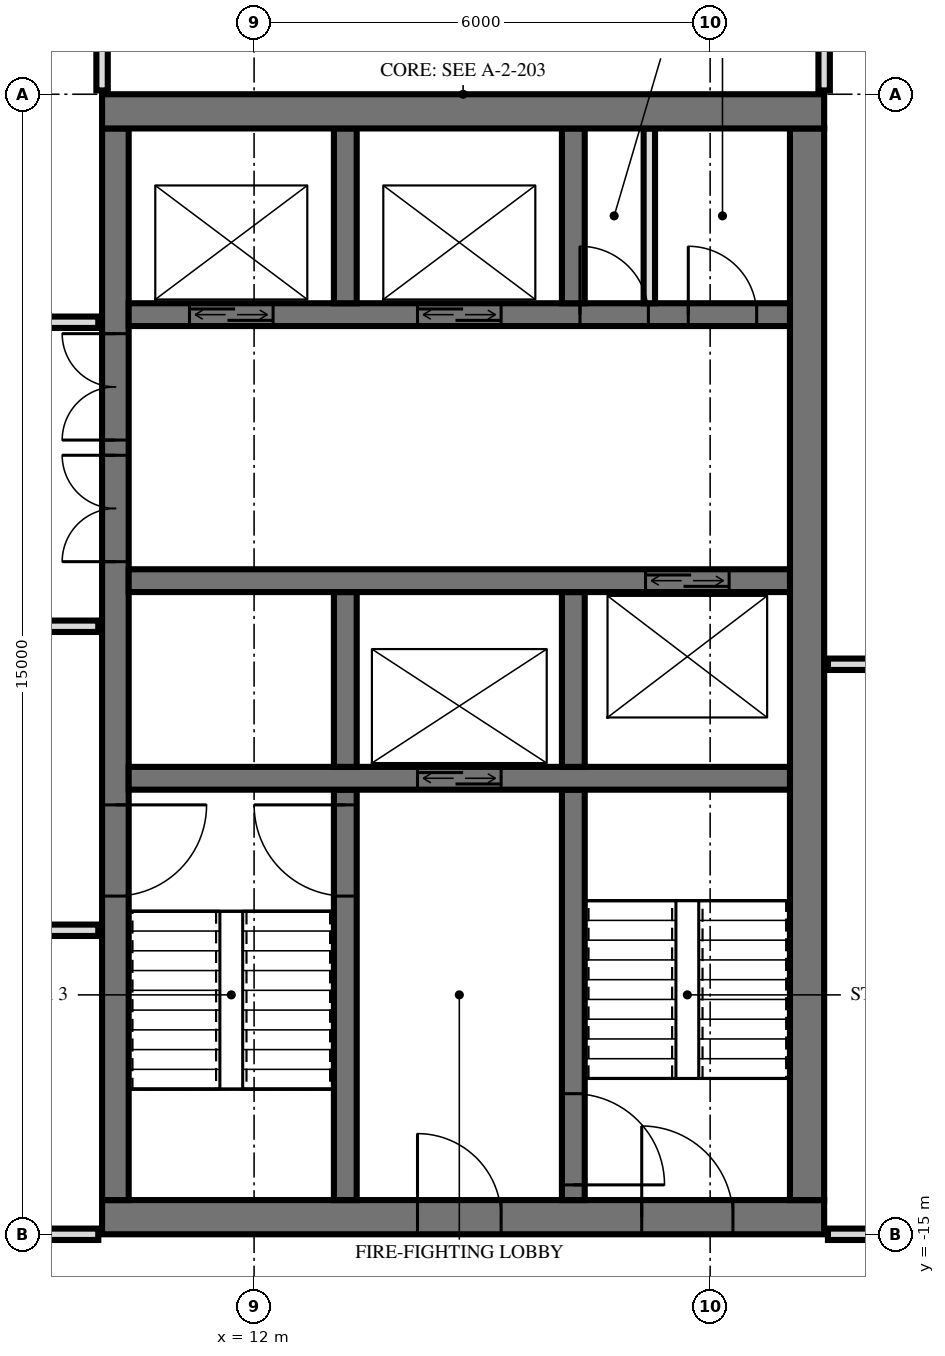
"""IFC4 building model, lengths in metres.
Left out: names, types, materials, properties, quantities, classifications, styles, units other than length and angle.
Written with IfcOpenShell. Run it as: python <this file> out.ifc"""

import sys

from ifc_helpers import new_model, si_unit, direction, frame, frame_2d, origin, place, context, subcontext, project, spatial, rectangle, extrude, element, fill, save


model = new_model("IFC4")
c1 = context("Model", 3, precision=1e-05, world=origin(), true_north=direction((0.0, 1.0)))
c2 = subcontext(c1, "Body", "Model", "MODEL_VIEW")
j1 = project(units=[si_unit("LENGTHUNIT", "METRE"), si_unit("PLANEANGLEUNIT", "RADIAN")], contexts=[c1])
p1 = place(None, origin())
s1 = spatial("IfcSite", under=j1, at=p1, CompositionType="ELEMENT")
p2 = place(p1, origin())
s2 = spatial("IfcBuilding", under=s1, at=p2, CompositionType="ELEMENT")
p3 = place(p2, frame((0.0, 0.0, 259.6)))
s3 = spatial("IfcBuildingStorey", under=s2, at=p3, CompositionType="ELEMENT", Elevation=259.6)
p4 = place(p3, frame((10.0, -0.225, 0.0), z_axis=(0.0, 0.0, 1.0), x_axis=(1.0, 0.0, 0.0)))
e1 = element("IfcWall", 1, at=p4, inside=s3, PredefinedType="SHEAR", context=c2, shape_type="SweptSolid", body=[
    extrude(rectangle(XDim=9.5, YDim=0.45, at=frame_2d((4.75, 0.0))), origin(), (0.0, 0.0, 1.0), 3.5),
])
p5 = place(p3, frame((10.0, -14.775, 0.0), z_axis=(0.0, 0.0, 1.0), x_axis=(1.0, 0.0, 0.0)))
e2 = element("IfcWall", 2, at=p5, inside=s3, PredefinedType="SHEAR", context=c2, shape_type="SweptSolid", body=[
    extrude(rectangle(XDim=9.5, YDim=0.45, at=frame_2d((4.75, 0.0))), origin(), (0.0, 0.0, 1.0), 3.5),
])
p6 = place(p5, frame((7.1, 0.0, 0.0)))
e3 = element("IfcOpeningElement", 3, at=p6, cuts=e2, PredefinedType="OPENING", context=c2, shape_type="SweptSolid", body=[
    extrude(rectangle(XDim=1.2, YDim=2.1, at=frame_2d((0.6, 1.05))), frame((0.0, 0.235, 0.0), z_axis=(0.0, -1.0, 0.0), x_axis=(1.0, 0.0, 0.0)), (0.0, 0.0, 1.0), 0.47),
])
p7 = place(p5, frame((4.15, 0.0, 0.0)))
e4 = element("IfcOpeningElement", 4, at=p7, cuts=e2, PredefinedType="OPENING", context=c2, shape_type="SweptSolid", body=[
    extrude(rectangle(XDim=1.1, YDim=2.1, at=frame_2d((0.55, 1.05))), frame((0.0, 0.235, 0.0), z_axis=(0.0, -1.0, 0.0), x_axis=(1.0, 0.0, 0.0)), (0.0, 0.0, 1.0), 0.47),
])
p8 = place(p3, frame((10.175, -14.55, 0.0), z_axis=(0.0, 0.0, 1.0), x_axis=(0.0, 1.0, 0.0)))
e5 = element("IfcWall", 5, at=p8, inside=s3, PredefinedType="SHEAR", context=c2, shape_type="SweptSolid", body=[
    extrude(rectangle(XDim=14.1, YDim=0.35, at=frame_2d((7.05, 0.0))), origin(), (0.0, 0.0, 1.0), 3.5),
])
p9 = place(p8, frame((8.4, 0.0, 0.0)))
e6 = element("IfcOpeningElement", 6, at=p9, cuts=e5, PredefinedType="OPENING", context=c2, shape_type="SweptSolid", body=[
    extrude(rectangle(XDim=1.4, YDim=2.4, at=frame_2d((0.7, 1.2))), frame((0.0, 0.185, 0.0), z_axis=(0.0, -1.0, 0.0), x_axis=(1.0, 0.0, 0.0)), (0.0, 0.0, 1.0), 0.37),
])
p10 = place(p8, frame((10.0, 0.0, 0.0)))
e7 = element("IfcOpeningElement", 7, at=p10, cuts=e5, PredefinedType="OPENING", context=c2, shape_type="SweptSolid", body=[
    extrude(rectangle(XDim=1.4, YDim=2.4, at=frame_2d((0.7, 1.2))), frame((0.0, 0.185, 0.0), z_axis=(0.0, -1.0, 0.0), x_axis=(1.0, 0.0, 0.0)), (0.0, 0.0, 1.0), 0.37),
])
p11 = place(p8, frame((4.0, 0.0, 0.0)))
e8 = element("IfcOpeningElement", 8, at=p11, cuts=e5, PredefinedType="OPENING", context=c2, shape_type="SweptSolid", body=[
    extrude(rectangle(XDim=1.2, YDim=2.1, at=frame_2d((0.6, 1.05))), frame((0.0, 0.185, 0.0), z_axis=(0.0, -1.0, 0.0), x_axis=(1.0, 0.0, 0.0)), (0.0, 0.0, 1.0), 0.37),
])
p12 = place(p3, frame((19.275, -14.55, 0.0), z_axis=(0.0, 0.0, 1.0), x_axis=(0.0, 1.0, 0.0)))
e9 = element("IfcWall", 9, at=p12, inside=s3, PredefinedType="SHEAR", context=c2, shape_type="SweptSolid", body=[
    extrude(rectangle(XDim=14.1, YDim=0.45, at=frame_2d((7.05, 0.0))), origin(), (0.0, 0.0, 1.0), 3.5),
])
p13 = place(p3, frame((10.35, -2.9, 0.0), z_axis=(0.0, 0.0, 1.0), x_axis=(1.0, 0.0, 0.0)))
e10 = element("IfcWall", 10, at=p13, inside=s3, PredefinedType="SHEAR", context=c2, shape_type="SweptSolid", body=[
    extrude(rectangle(XDim=8.7, YDim=0.3, at=frame_2d((4.35, 0.0))), origin(), (0.0, 0.0, 1.0), 3.5),
])
p14 = place(p13, frame((0.8, 0.0, 0.0)))
e11 = element("IfcOpeningElement", 11, at=p14, cuts=e10, PredefinedType="OPENING", context=c2, shape_type="SweptSolid", body=[
    extrude(rectangle(XDim=1.1, YDim=2.1, at=frame_2d((0.55, 1.05))), frame((0.0, 0.16, 0.0), z_axis=(0.0, -1.0, 0.0), x_axis=(1.0, 0.0, 0.0)), (0.0, 0.0, 1.0), 0.32),
])
p15 = place(p13, frame((3.8, 0.0, 0.0)))
e12 = element("IfcOpeningElement", 12, at=p15, cuts=e10, PredefinedType="OPENING", context=c2, shape_type="SweptSolid", body=[
    extrude(rectangle(XDim=1.1, YDim=2.1, at=frame_2d((0.55, 1.05))), frame((0.0, 0.16, 0.0), z_axis=(0.0, -1.0, 0.0), x_axis=(1.0, 0.0, 0.0)), (0.0, 0.0, 1.0), 0.32),
])
p16 = place(p13, frame((5.938, 0.0, 0.0)))
e13 = element("IfcOpeningElement", 13, at=p16, cuts=e10, PredefinedType="OPENING", context=c2, shape_type="SweptSolid", body=[
    extrude(rectangle(XDim=0.9, YDim=2.1, at=frame_2d((0.45, 1.05))), frame((0.0, 0.16, 0.0), z_axis=(0.0, -1.0, 0.0), x_axis=(1.0, 0.0, 0.0)), (0.0, 0.0, 1.0), 0.32),
])
p17 = place(p13, frame((7.363, 0.0, 0.0)))
e14 = element("IfcOpeningElement", 14, at=p17, cuts=e10, PredefinedType="OPENING", context=c2, shape_type="SweptSolid", body=[
    extrude(rectangle(XDim=0.9, YDim=2.1, at=frame_2d((0.45, 1.05))), frame((0.0, 0.16, 0.0), z_axis=(0.0, -1.0, 0.0), x_axis=(1.0, 0.0, 0.0)), (0.0, 0.0, 1.0), 0.32),
])
p18 = place(p3, frame((10.35, -6.4, 0.0), z_axis=(0.0, 0.0, 1.0), x_axis=(1.0, 0.0, 0.0)))
e15 = element("IfcWall", 15, at=p18, inside=s3, PredefinedType="SHEAR", context=c2, shape_type="SweptSolid", body=[
    extrude(rectangle(XDim=8.7, YDim=0.3, at=frame_2d((4.35, 0.0))), origin(), (0.0, 0.0, 1.0), 3.5),
])
p19 = place(p18, frame((6.8, 0.0, 0.0)))
e16 = element("IfcOpeningElement", 16, at=p19, cuts=e15, PredefinedType="OPENING", context=c2, shape_type="SweptSolid", body=[
    extrude(rectangle(XDim=1.1, YDim=2.1, at=frame_2d((0.55, 1.05))), frame((0.0, 0.16, 0.0), z_axis=(0.0, -1.0, 0.0), x_axis=(1.0, 0.0, 0.0)), (0.0, 0.0, 1.0), 0.32),
])
p20 = place(p3, frame((10.35, -9.0, 0.0), z_axis=(0.0, 0.0, 1.0), x_axis=(1.0, 0.0, 0.0)))
e17 = element("IfcWall", 17, at=p20, inside=s3, PredefinedType="SHEAR", context=c2, shape_type="SweptSolid", body=[
    extrude(rectangle(XDim=8.7, YDim=0.3, at=frame_2d((4.35, 0.0))), origin(), (0.0, 0.0, 1.0), 3.5),
])
p21 = place(p20, frame((3.8, 0.0, 0.0)))
e18 = element("IfcOpeningElement", 18, at=p21, cuts=e17, PredefinedType="OPENING", context=c2, shape_type="SweptSolid", body=[
    extrude(rectangle(XDim=1.1, YDim=2.1, at=frame_2d((0.55, 1.05))), frame((0.0, 0.16, 0.0), z_axis=(0.0, -1.0, 0.0), x_axis=(1.0, 0.0, 0.0)), (0.0, 0.0, 1.0), 0.32),
])
for number, where, z_axis, x_axis in (
    (19, (13.2, -2.75, 0.0), (0.0, 0.0, 1.0), (0.0, 1.0, 0.0)),
    (20, (13.2, -8.85, 0.0), (0.0, 0.0, 1.0), (0.0, 1.0, 0.0)),
):
    element("IfcWall", number, at=place(p3, frame(where, z_axis=z_axis, x_axis=x_axis)), inside=s3, PredefinedType="SHEAR", context=c2, shape_type="SweptSolid", body=[
        extrude(rectangle(XDim=2.3, YDim=0.3, at=frame_2d((1.15, 0.0))), origin(), (0.0, 0.0, 1.0), 3.5),
    ])
p22 = place(p3, frame((13.2, -14.55, 0.0), z_axis=(0.0, 0.0, 1.0), x_axis=(0.0, 1.0, 0.0)))
e21 = element("IfcWall", 21, at=p22, inside=s3, PredefinedType="SHEAR", context=c2, shape_type="SweptSolid", body=[
    extrude(rectangle(XDim=5.4, YDim=0.3, at=frame_2d((2.7, 0.0))), origin(), (0.0, 0.0, 1.0), 3.5),
])
p23 = place(p22, frame((4.0, 0.0, 0.0)))
e22 = element("IfcOpeningElement", 22, at=p23, cuts=e21, PredefinedType="OPENING", context=c2, shape_type="SweptSolid", body=[
    extrude(rectangle(XDim=1.2, YDim=2.1, at=frame_2d((0.6, 1.05))), frame((0.0, 0.16, 0.0), z_axis=(0.0, -1.0, 0.0), x_axis=(1.0, 0.0, 0.0)), (0.0, 0.0, 1.0), 0.32),
])
for number, where, z_axis, x_axis in (
    (23, (16.2, -2.75, 0.0), (0.0, 0.0, 1.0), (0.0, 1.0, 0.0)),
    (24, (16.2, -8.85, 0.0), (0.0, 0.0, 1.0), (0.0, 1.0, 0.0)),
):
    element("IfcWall", number, at=place(p3, frame(where, z_axis=z_axis, x_axis=x_axis)), inside=s3, PredefinedType="SHEAR", context=c2, shape_type="SweptSolid", body=[
        extrude(rectangle(XDim=2.3, YDim=0.3, at=frame_2d((1.15, 0.0))), origin(), (0.0, 0.0, 1.0), 3.5),
    ])
p24 = place(p3, frame((16.2, -14.55, 0.0), z_axis=(0.0, 0.0, 1.0), x_axis=(0.0, 1.0, 0.0)))
e25 = element("IfcWall", 25, at=p24, inside=s3, PredefinedType="SHEAR", context=c2, shape_type="SweptSolid", body=[
    extrude(rectangle(XDim=5.4, YDim=0.3, at=frame_2d((2.7, 0.0))), origin(), (0.0, 0.0, 1.0), 3.5),
])
p25 = place(p24, frame((0.2, 0.0, 0.0)))
e26 = element("IfcOpeningElement", 26, at=p25, cuts=e25, PredefinedType="OPENING", context=c2, shape_type="SweptSolid", body=[
    extrude(rectangle(XDim=1.2, YDim=2.1, at=frame_2d((0.6, 1.05))), frame((0.0, 0.16, 0.0), z_axis=(0.0, -1.0, 0.0), x_axis=(1.0, 0.0, 0.0)), (0.0, 0.0, 1.0), 0.32),
])
p26 = place(p3, frame((17.2, -2.75, 0.0), z_axis=(0.0, 0.0, 1.0), x_axis=(0.0, 1.0, 0.0)))
e27 = element("IfcWall", 27, at=p26, inside=s3, PredefinedType="PARTITIONING", context=c2, shape_type="SweptSolid", body=[
    extrude(rectangle(XDim=2.3, YDim=0.15, at=frame_2d((1.15, 0.0))), origin(), (0.0, 0.0, 1.0), 3.2),
])
p27 = place(p3, frame((19.5, 0.05, 0.0), z_axis=(0.0, 0.0, 1.0), x_axis=(0.0, 1.0, 0.0)))
e28 = element("IfcWall", 28, at=p27, inside=s3, PredefinedType="PARTITIONING", context=c2, shape_type="SweptSolid", body=[
    extrude(rectangle(XDim=0.787, YDim=0.15, at=frame_2d((0.394, 0.0))), origin(), (0.0, 0.0, 1.0), 3.22),
])
p28 = place(p3, frame((10.0, 0.05, 0.0), z_axis=(0.0, 0.0, 1.0), x_axis=(0.0, 1.0, 0.0)))
e29 = element("IfcWall", 29, at=p28, inside=s3, PredefinedType="PARTITIONING", context=c2, shape_type="SweptSolid", body=[
    extrude(rectangle(XDim=0.97, YDim=0.15, at=frame_2d((0.485, 0.0))), origin(), (0.0, 0.0, 1.0), 3.22),
])
p29 = place(p3, frame((-9.95, -15.0, 0.0), z_axis=(0.0, 0.0, 1.0), x_axis=(1.0, 0.0, 0.0)))
e30 = element("IfcWall", 30, at=p29, inside=s3, PredefinedType="PARTITIONING", context=c2, shape_type="SweptSolid", body=[
    extrude(rectangle(XDim=19.9, YDim=0.15, at=frame_2d((9.95, 0.0))), origin(), (0.0, 0.0, 1.0), 2.584),
])
p30 = place(p29, frame((9.45, 0.0, 0.0)))
e31 = element("IfcOpeningElement", 31, at=p30, cuts=e30, PredefinedType="OPENING", context=c2, shape_type="SweptSolid", body=[
    extrude(rectangle(XDim=1.0, YDim=2.1, at=frame_2d((0.5, 1.05))), frame((0.0, 0.085, 0.0), z_axis=(0.0, -1.0, 0.0), x_axis=(1.0, 0.0, 0.0)), (0.0, 0.0, 1.0), 0.17),
])
p31 = place(p3, frame((19.55, -15.0, 0.0), z_axis=(0.0, 0.0, 1.0), x_axis=(1.0, 0.0, 0.0)))
e32 = element("IfcWall", 32, at=p31, inside=s3, PredefinedType="PARTITIONING", context=c2, shape_type="SweptSolid", body=[
    extrude(rectangle(XDim=3.37, YDim=0.15, at=frame_2d((1.685, 0.0))), origin(), (0.0, 0.0, 1.0), 3.22),
])
p32 = place(p31, frame((0.9, 0.0, 0.0)))
e33 = element("IfcOpeningElement", 33, at=p32, cuts=e32, PredefinedType="OPENING", context=c2, shape_type="SweptSolid", body=[
    extrude(rectangle(XDim=1.0, YDim=2.1, at=frame_2d((0.5, 1.05))), frame((0.0, 0.085, 0.0), z_axis=(0.0, -1.0, 0.0), x_axis=(1.0, 0.0, 0.0)), (0.0, 0.0, 1.0), 0.17),
])
p33 = place(p3, frame((-9.95, -11.0, 0.0), z_axis=(0.0, 0.0, 1.0), x_axis=(1.0, 0.0, 0.0)))
e34 = element("IfcWall", 34, at=p33, inside=s3, PredefinedType="PARTITIONING", context=c2, shape_type="SweptSolid", body=[
    extrude(rectangle(XDim=19.9, YDim=0.15, at=frame_2d((9.95, 0.0))), origin(), (0.0, 0.0, 1.0), 3.22),
])
p34 = place(p33, frame((9.45, 0.0, 0.0)))
e35 = element("IfcOpeningElement", 35, at=p34, cuts=e34, PredefinedType="OPENING", context=c2, shape_type="SweptSolid", body=[
    extrude(rectangle(XDim=1.0, YDim=2.1, at=frame_2d((0.5, 1.05))), frame((0.0, 0.085, 0.0), z_axis=(0.0, -1.0, 0.0), x_axis=(1.0, 0.0, 0.0)), (0.0, 0.0, 1.0), 0.17),
])
p35 = place(p33, frame((15.45, 0.0, 0.0)))
e36 = element("IfcOpeningElement", 36, at=p35, cuts=e34, PredefinedType="OPENING", context=c2, shape_type="SweptSolid", body=[
    extrude(rectangle(XDim=1.0, YDim=2.1, at=frame_2d((0.5, 1.05))), frame((0.0, 0.085, 0.0), z_axis=(0.0, -1.0, 0.0), x_axis=(1.0, 0.0, 0.0)), (0.0, 0.0, 1.0), 0.17),
])
p36 = place(p3, frame((19.55, -7.5, 0.0), z_axis=(0.0, 0.0, 1.0), x_axis=(1.0, 0.0, 0.0)))
e37 = element("IfcWall", 37, at=p36, inside=s3, PredefinedType="PARTITIONING", context=c2, shape_type="SweptSolid", body=[
    extrude(rectangle(XDim=3.37, YDim=0.15, at=frame_2d((1.685, 0.0))), origin(), (0.0, 0.0, 1.0), 3.22),
])
p37 = place(p36, frame((1.3, 0.0, 0.0)))
e38 = element("IfcOpeningElement", 38, at=p37, cuts=e37, PredefinedType="OPENING", context=c2, shape_type="SweptSolid", body=[
    extrude(rectangle(XDim=0.9, YDim=2.1, at=frame_2d((0.45, 1.05))), frame((0.0, 0.085, 0.0), z_axis=(0.0, -1.0, 0.0), x_axis=(1.0, 0.0, 0.0)), (0.0, 0.0, 1.0), 0.17),
])
p38 = place(p3, frame((-9.95, -7.0, 0.0), z_axis=(0.0, 0.0, 1.0), x_axis=(1.0, 0.0, 0.0)))
e39 = element("IfcWall", 39, at=p38, inside=s3, PredefinedType="PARTITIONING", context=c2, shape_type="SweptSolid", body=[
    extrude(rectangle(XDim=19.9, YDim=0.15, at=frame_2d((9.95, 0.0))), origin(), (0.0, 0.0, 1.0), 3.22),
])
p39 = place(p38, frame((9.45, 0.0, 0.0)))
e40 = element("IfcOpeningElement", 40, at=p39, cuts=e39, PredefinedType="OPENING", context=c2, shape_type="SweptSolid", body=[
    extrude(rectangle(XDim=1.0, YDim=2.1, at=frame_2d((0.5, 1.05))), frame((0.0, 0.085, 0.0), z_axis=(0.0, -1.0, 0.0), x_axis=(1.0, 0.0, 0.0)), (0.0, 0.0, 1.0), 0.17),
])
p40 = place(p38, frame((3.45, 0.0, 0.0)))
e41 = element("IfcOpeningElement", 41, at=p40, cuts=e39, PredefinedType="OPENING", context=c2, shape_type="SweptSolid", body=[
    extrude(rectangle(XDim=1.0, YDim=2.1, at=frame_2d((0.5, 1.05))), frame((0.0, 0.085, 0.0), z_axis=(0.0, -1.0, 0.0), x_axis=(1.0, 0.0, 0.0)), (0.0, 0.0, 1.0), 0.17),
])
p41 = place(p3, frame((-9.95, -3.0, 0.0), z_axis=(0.0, 0.0, 1.0), x_axis=(1.0, 0.0, 0.0)))
e42 = element("IfcWall", 42, at=p41, inside=s3, PredefinedType="PARTITIONING", context=c2, shape_type="SweptSolid", body=[
    extrude(rectangle(XDim=19.9, YDim=0.15, at=frame_2d((9.95, 0.0))), origin(), (0.0, 0.0, 1.0), 3.22),
])
p42 = place(p41, frame((0.95, 0.0, 0.0)))
e43 = element("IfcOpeningElement", 43, at=p42, cuts=e42, PredefinedType="OPENING", context=c2, shape_type="SweptSolid", body=[
    extrude(rectangle(XDim=1.0, YDim=2.1, at=frame_2d((0.5, 1.05))), frame((0.0, 0.085, 0.0), z_axis=(0.0, -1.0, 0.0), x_axis=(1.0, 0.0, 0.0)), (0.0, 0.0, 1.0), 0.17),
])
p43 = place(p41, frame((3.7, 0.0, 0.0)))
e44 = element("IfcOpeningElement", 44, at=p43, cuts=e42, PredefinedType="OPENING", context=c2, shape_type="SweptSolid", body=[
    extrude(rectangle(XDim=1.0, YDim=2.1, at=frame_2d((0.5, 1.05))), frame((0.0, 0.085, 0.0), z_axis=(0.0, -1.0, 0.0), x_axis=(1.0, 0.0, 0.0)), (0.0, 0.0, 1.0), 0.17),
])
p44 = place(p41, frame((8.45, 0.0, 0.0)))
e45 = element("IfcOpeningElement", 45, at=p44, cuts=e42, PredefinedType="OPENING", context=c2, shape_type="SweptSolid", body=[
    extrude(rectangle(XDim=1.0, YDim=2.1, at=frame_2d((0.5, 1.05))), frame((0.0, 0.085, 0.0), z_axis=(0.0, -1.0, 0.0), x_axis=(1.0, 0.0, 0.0)), (0.0, 0.0, 1.0), 0.17),
])
p45 = place(p41, frame((15.7, 0.0, 0.0)))
e46 = element("IfcOpeningElement", 46, at=p45, cuts=e42, PredefinedType="OPENING", context=c2, shape_type="SweptSolid", body=[
    extrude(rectangle(XDim=1.0, YDim=2.1, at=frame_2d((0.5, 1.05))), frame((0.0, 0.085, 0.0), z_axis=(0.0, -1.0, 0.0), x_axis=(1.0, 0.0, 0.0)), (0.0, 0.0, 1.0), 0.17),
])
p46 = place(p14, origin())
e47 = element("IfcDoor", 47, at=p46, inside=s3, OperationType="DOUBLE_DOOR_SLIDING", PredefinedType="USERDEFINED", context=c2, shape_type="SweptSolid", body=[
    extrude(rectangle(XDim=1.1, YDim=2.1, at=frame_2d((0.55, 1.05))), frame((0.0, 0.025, 0.0), z_axis=(0.0, -1.0, 0.0), x_axis=(1.0, 0.0, 0.0)), (0.0, 0.0, 1.0), 0.05),
])
fill(e11, e47)
p47 = place(p15, origin())
e48 = element("IfcDoor", 48, at=p47, inside=s3, OperationType="DOUBLE_DOOR_SLIDING", PredefinedType="USERDEFINED", context=c2, shape_type="SweptSolid", body=[
    extrude(rectangle(XDim=1.1, YDim=2.1, at=frame_2d((0.55, 1.05))), frame((0.0, 0.025, 0.0), z_axis=(0.0, -1.0, 0.0), x_axis=(1.0, 0.0, 0.0)), (0.0, 0.0, 1.0), 0.05),
])
fill(e12, e48)
p48 = place(p21, origin())
e49 = element("IfcDoor", 49, at=p48, inside=s3, OperationType="DOUBLE_DOOR_SLIDING", PredefinedType="USERDEFINED", context=c2, shape_type="SweptSolid", body=[
    extrude(rectangle(XDim=1.1, YDim=2.1, at=frame_2d((0.55, 1.05))), frame((0.0, 0.025, 0.0), z_axis=(0.0, -1.0, 0.0), x_axis=(1.0, 0.0, 0.0)), (0.0, 0.0, 1.0), 0.05),
])
fill(e18, e49)
p49 = place(p19, origin())
e50 = element("IfcDoor", 50, at=p49, inside=s3, OperationType="DOUBLE_DOOR_SLIDING", PredefinedType="USERDEFINED", context=c2, shape_type="SweptSolid", body=[
    extrude(rectangle(XDim=1.1, YDim=2.1, at=frame_2d((0.55, 1.05))), frame((0.0, 0.025, 0.0), z_axis=(0.0, -1.0, 0.0), x_axis=(1.0, 0.0, 0.0)), (0.0, 0.0, 1.0), 0.05),
])
fill(e16, e50)
p50 = place(p9, origin())
e51 = element("IfcDoor", 51, at=p50, inside=s3, OperationType="DOUBLE_DOOR_SINGLE_SWING", PredefinedType="DOOR", context=c2, shape_type="SweptSolid", body=[
    extrude(rectangle(XDim=1.4, YDim=2.4, at=frame_2d((0.7, 1.2))), frame((0.0, 0.025, 0.0), z_axis=(0.0, -1.0, 0.0), x_axis=(1.0, 0.0, 0.0)), (0.0, 0.0, 1.0), 0.05),
])
fill(e6, e51)
p51 = place(p10, origin())
e52 = element("IfcDoor", 52, at=p51, inside=s3, OperationType="DOUBLE_DOOR_SINGLE_SWING", PredefinedType="DOOR", context=c2, shape_type="SweptSolid", body=[
    extrude(rectangle(XDim=1.4, YDim=2.4, at=frame_2d((0.7, 1.2))), frame((0.0, 0.025, 0.0), z_axis=(0.0, -1.0, 0.0), x_axis=(1.0, 0.0, 0.0)), (0.0, 0.0, 1.0), 0.05),
])
fill(e7, e52)
p52 = place(p11, frame((0.6, 0.0, 0.0), z_axis=(0.0, 0.0, 1.0), x_axis=(-1.0, 0.0, 0.0)))
e53 = element("IfcDoor", 53, at=p52, inside=s3, OperationType="SINGLE_SWING_RIGHT", PredefinedType="DOOR", context=c2, shape_type="SweptSolid", body=[
    extrude(rectangle(XDim=1.2, YDim=2.1, at=frame_2d((0.0, 1.05))), frame((0.0, -0.025, 0.0), z_axis=(0.0, 1.0, 0.0), x_axis=(-1.0, 0.0, 0.0)), (0.0, 0.0, 1.0), 0.05),
])
fill(e8, e53)
p53 = place(p6, origin())
e54 = element("IfcDoor", 54, at=p53, inside=s3, OperationType="SINGLE_SWING_RIGHT", PredefinedType="DOOR", context=c2, shape_type="SweptSolid", body=[
    extrude(rectangle(XDim=1.2, YDim=2.1, at=frame_2d((0.6, 1.05))), frame((0.0, 0.025, 0.0), z_axis=(0.0, -1.0, 0.0), x_axis=(1.0, 0.0, 0.0)), (0.0, 0.0, 1.0), 0.05),
])
fill(e3, e54)
p54 = place(p7, origin())
e55 = element("IfcDoor", 55, at=p54, inside=s3, OperationType="SINGLE_SWING_RIGHT", PredefinedType="DOOR", context=c2, shape_type="SweptSolid", body=[
    extrude(rectangle(XDim=1.1, YDim=2.1, at=frame_2d((0.55, 1.05))), frame((0.0, 0.025, 0.0), z_axis=(0.0, -1.0, 0.0), x_axis=(1.0, 0.0, 0.0)), (0.0, 0.0, 1.0), 0.05),
])
fill(e4, e55)
p55 = place(p16, origin())
e56 = element("IfcDoor", 56, at=p55, inside=s3, OperationType="SINGLE_SWING_RIGHT", PredefinedType="DOOR", context=c2, shape_type="SweptSolid", body=[
    extrude(rectangle(XDim=0.9, YDim=2.1, at=frame_2d((0.45, 1.05))), frame((0.0, 0.025, 0.0), z_axis=(0.0, -1.0, 0.0), x_axis=(1.0, 0.0, 0.0)), (0.0, 0.0, 1.0), 0.05),
])
fill(e13, e56)
p56 = place(p17, origin())
e57 = element("IfcDoor", 57, at=p56, inside=s3, OperationType="SINGLE_SWING_RIGHT", PredefinedType="DOOR", context=c2, shape_type="SweptSolid", body=[
    extrude(rectangle(XDim=0.9, YDim=2.1, at=frame_2d((0.45, 1.05))), frame((0.0, 0.025, 0.0), z_axis=(0.0, -1.0, 0.0), x_axis=(1.0, 0.0, 0.0)), (0.0, 0.0, 1.0), 0.05),
])
fill(e14, e57)
p57 = place(p23, origin())
e58 = element("IfcDoor", 58, at=p57, inside=s3, OperationType="SINGLE_SWING_LEFT", PredefinedType="DOOR", context=c2, shape_type="SweptSolid", body=[
    extrude(rectangle(XDim=1.2, YDim=2.1, at=frame_2d((0.6, 1.05))), frame((0.0, 0.025, 0.0), z_axis=(0.0, -1.0, 0.0), x_axis=(1.0, 0.0, 0.0)), (0.0, 0.0, 1.0), 0.05),
])
fill(e22, e58)
p58 = place(p25, frame((0.6, 0.0, 0.0), z_axis=(0.0, 0.0, 1.0), x_axis=(-1.0, 0.0, 0.0)))
e59 = element("IfcDoor", 59, at=p58, inside=s3, OperationType="SINGLE_SWING_LEFT", PredefinedType="DOOR", context=c2, shape_type="SweptSolid", body=[
    extrude(rectangle(XDim=1.2, YDim=2.1, at=frame_2d((0.0, 1.05))), frame((0.0, -0.025, 0.0), z_axis=(0.0, 1.0, 0.0), x_axis=(-1.0, 0.0, 0.0)), (0.0, 0.0, 1.0), 0.05),
])
fill(e26, e59)
save(model, sys.argv[1])
